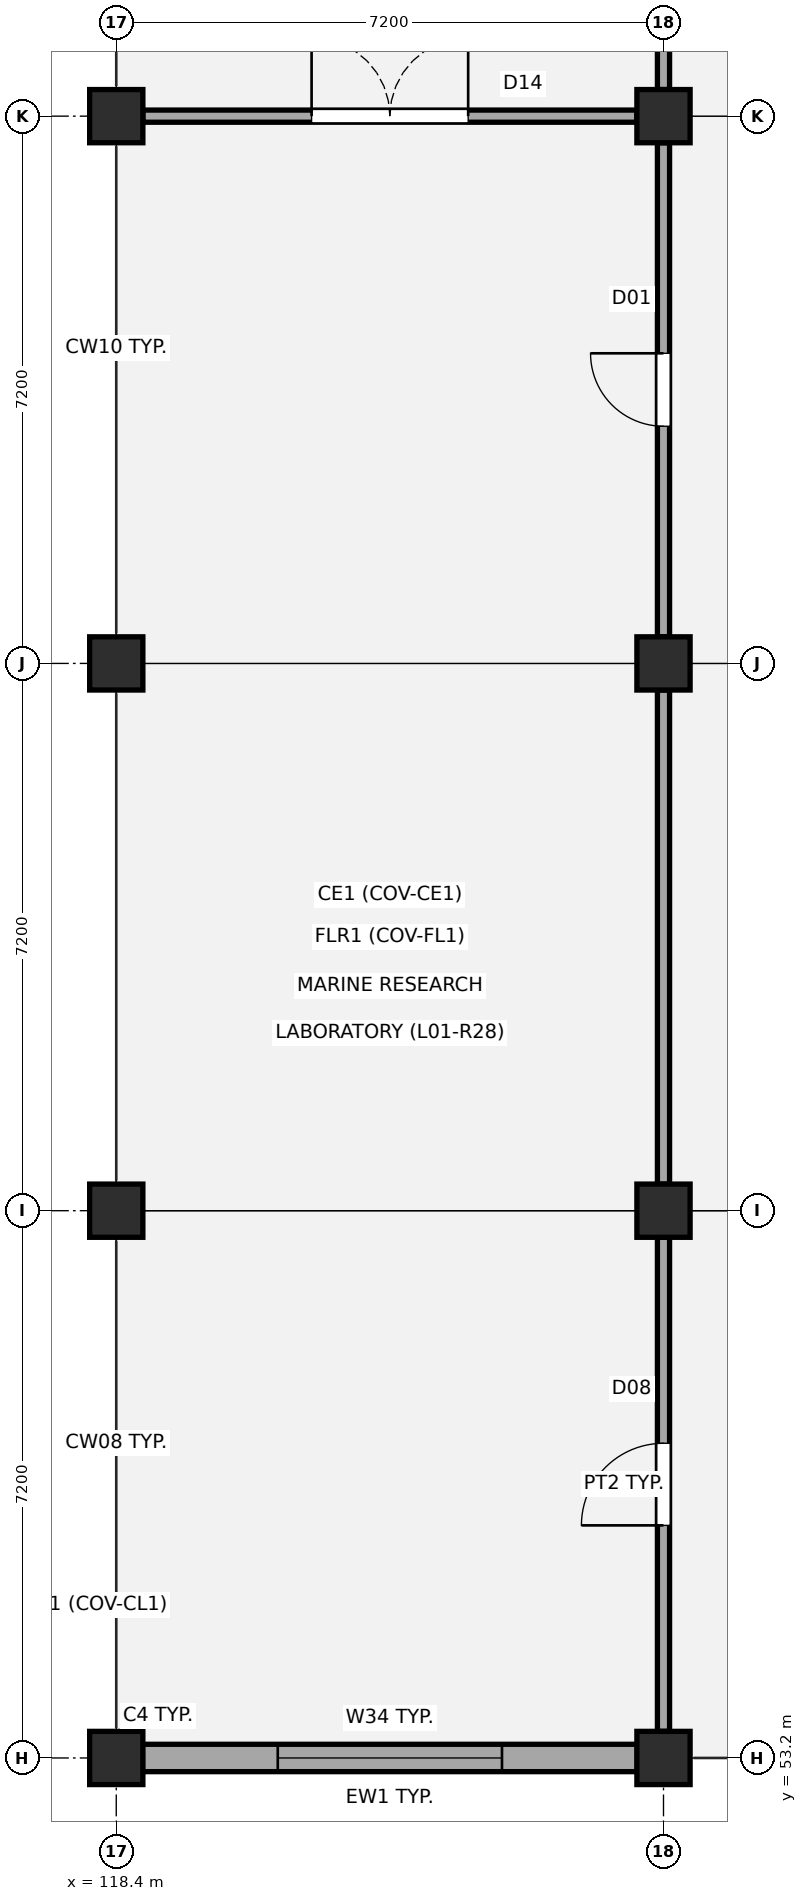
"""IFC4 building model, lengths in metres.
Left out: names, types, materials, properties, quantities, classifications, styles, units other than length and angle.
Written with IfcOpenShell. Run it as: python <this file> out.ifc"""

import sys

from ifc_helpers import new_model, si_unit, direction, frame, frame_2d, origin, origin_2d, place, context, subcontext, project, spatial, rectangle, extrude, element, fill, save


model = new_model("IFC4")
c1 = context("Model", 3, precision=1e-05, world=origin(), true_north=direction((0.0, 1.0)))
c2 = subcontext(c1, "Body", "Model", "MODEL_VIEW")
j1 = project(units=[si_unit("LENGTHUNIT", "METRE"), si_unit("PLANEANGLEUNIT", "RADIAN")], contexts=[c1])
p1 = place(None, origin())
s1 = spatial("IfcSite", under=j1, at=p1, CompositionType="ELEMENT")
p2 = place(p1, origin())
s2 = spatial("IfcBuilding", under=s1, at=p2, CompositionType="ELEMENT")
p3 = place(p2, frame((0.0, 0.0, 4.68)))
s3 = spatial("IfcBuildingStorey", under=s2, at=p3, CompositionType="ELEMENT", Elevation=4.68)
for number, where, z_axis, x_axis in (
    (1, (118.4, 53.2, 0.0), (0.0, 0.0, 1.0), (1.0, 0.0, 0.0)),
    (2, (118.4, 60.4, 0.0), (0.0, 0.0, 1.0), (1.0, 0.0, 0.0)),
    (3, (118.4, 67.6, 0.0), (0.0, 0.0, 1.0), (1.0, 0.0, 0.0)),
    (4, (118.4, 74.8, 0.0), (0.0, 0.0, 1.0), (1.0, 0.0, 0.0)),
    (5, (125.6, 53.2, 0.0), (0.0, 0.0, 1.0), (1.0, 0.0, 0.0)),
    (6, (125.6, 60.4, 0.0), (0.0, 0.0, 1.0), (1.0, 0.0, 0.0)),
    (7, (125.6, 67.6, 0.0), (0.0, 0.0, 1.0), (1.0, 0.0, 0.0)),
    (8, (125.6, 74.8, 0.0), (0.0, 0.0, 1.0), (1.0, 0.0, 0.0)),
):
    element("IfcColumn", number, at=place(p3, frame(where, z_axis=z_axis, x_axis=x_axis)), inside=s3, PredefinedType="COLUMN", context=c2, shape_type="SweptSolid", body=[
        extrude(rectangle(XDim=0.7, YDim=0.7, at=origin_2d()), origin(), (0.0, 0.0, 1.0), 4.5),
    ])
p4 = place(p3, frame((125.255, 53.2, 0.0), z_axis=(0.0, 0.0, 1.0), x_axis=(-1.0, 0.0, 0.0)))
e9 = element("IfcWall", 9, at=p4, inside=s3, PredefinedType="STANDARD", context=c2, shape_type="SweptSolid", body=[
    extrude(rectangle(XDim=6.51, YDim=0.36, at=frame_2d((3.255, 0.0))), origin(), (0.0, 0.0, 1.0), 3.51),
])
p5 = place(p4, frame((1.78, 0.0, 0.95)))
e10 = element("IfcOpeningElement", 10, at=p5, cuts=e9, PredefinedType="OPENING", context=c2, shape_type="SweptSolid", body=[
    extrude(rectangle(XDim=2.95, YDim=1.45, at=frame_2d((1.475, 0.725))), frame((0.0, 0.19, 0.0), z_axis=(0.0, -1.0, 0.0), x_axis=(1.0, 0.0, 0.0)), (0.0, 0.0, 1.0), 0.38),
])
p6 = place(p3, frame((125.6, 53.55, 0.0), z_axis=(0.0, 0.0, 1.0), x_axis=(0.0, 1.0, 0.0)))
e11 = element("IfcWall", 11, at=p6, inside=s3, PredefinedType="PARTITIONING", context=c2, shape_type="SweptSolid", body=[
    extrude(rectangle(XDim=6.5, YDim=0.16, at=frame_2d((3.25, 0.0))), origin(), (0.0, 0.0, 1.0), 3.59),
])
p7 = place(p6, frame((2.71, 0.0, 0.0)))
e12 = element("IfcOpeningElement", 12, at=p7, cuts=e11, PredefinedType="OPENING", context=c2, shape_type="SweptSolid", body=[
    extrude(rectangle(XDim=1.08, YDim=2.16, at=frame_2d((0.54, 1.08))), frame((0.0, 0.09, 0.0), z_axis=(0.0, -1.0, 0.0), x_axis=(1.0, 0.0, 0.0)), (0.0, 0.0, 1.0), 0.18),
])
p8 = place(p3, frame((125.6, 60.75, 0.0), z_axis=(0.0, 0.0, 1.0), x_axis=(0.0, 1.0, 0.0)))
e13 = element("IfcWall", 13, at=p8, inside=s3, PredefinedType="PARTITIONING", context=c2, shape_type="SweptSolid", body=[
    extrude(rectangle(XDim=6.5, YDim=0.16, at=frame_2d((3.25, 0.0))), origin(), (0.0, 0.0, 1.0), 3.54),
])
p9 = place(p3, frame((125.6, 67.95, 0.0), z_axis=(0.0, 0.0, 1.0), x_axis=(0.0, 1.0, 0.0)))
e14 = element("IfcWall", 14, at=p9, inside=s3, PredefinedType="PARTITIONING", context=c2, shape_type="SweptSolid", body=[
    extrude(rectangle(XDim=6.5, YDim=0.16, at=frame_2d((3.25, 0.0))), origin(), (0.0, 0.0, 1.0), 3.59),
])
p10 = place(p9, frame((2.77, 0.0, 0.0)))
e15 = element("IfcOpeningElement", 15, at=p10, cuts=e14, PredefinedType="OPENING", context=c2, shape_type="SweptSolid", body=[
    extrude(rectangle(XDim=0.96, YDim=2.1, at=frame_2d((0.48, 1.05))), frame((0.0, 0.09, 0.0), z_axis=(0.0, -1.0, 0.0), x_axis=(1.0, 0.0, 0.0)), (0.0, 0.0, 1.0), 0.18),
])
p11 = place(p3, frame((118.75, 74.8, 0.0), z_axis=(0.0, 0.0, 1.0), x_axis=(1.0, 0.0, 0.0)))
e16 = element("IfcWall", 16, at=p11, inside=s3, PredefinedType="PARTITIONING", context=c2, shape_type="SweptSolid", body=[
    extrude(rectangle(XDim=6.5, YDim=0.16, at=frame_2d((3.25, 0.0))), origin(), (0.0, 0.0, 1.0), 3.54),
])
p12 = place(p11, frame((2.22, 0.0, 0.0)))
e17 = element("IfcOpeningElement", 17, at=p12, cuts=e16, PredefinedType="OPENING", context=c2, shape_type="SweptSolid", body=[
    extrude(rectangle(XDim=2.06, YDim=2.28, at=frame_2d((1.03, 1.14))), frame((0.0, 0.09, 0.0), z_axis=(0.0, -1.0, 0.0), x_axis=(1.0, 0.0, 0.0)), (0.0, 0.0, 1.0), 0.18),
])
p13 = place(p3, frame((125.6, 75.15, 0.0), z_axis=(0.0, 0.0, 1.0), x_axis=(0.0, 1.0, 0.0)))
e18 = element("IfcWall", 18, at=p13, inside=s3, PredefinedType="PARTITIONING", context=c2, shape_type="SweptSolid", body=[
    extrude(rectangle(XDim=6.5, YDim=0.16, at=frame_2d((3.25, 0.0))), origin(), (0.0, 0.0, 1.0), 3.54),
])
p14 = place(p13, frame((2.71, 0.0, 0.0)))
e19 = element("IfcOpeningElement", 19, at=p14, cuts=e18, PredefinedType="OPENING", context=c2, shape_type="SweptSolid", body=[
    extrude(rectangle(XDim=1.08, YDim=2.16, at=frame_2d((0.54, 1.08))), frame((0.0, 0.09, 0.0), z_axis=(0.0, -1.0, 0.0), x_axis=(1.0, 0.0, 0.0)), (0.0, 0.0, 1.0), 0.18),
])
p15 = place(p5, origin())
e20 = element("IfcWindow", 20, at=p15, inside=s3, PartitioningType="SINGLE_PANEL", PredefinedType="WINDOW", context=c2, shape_type="SweptSolid", body=[
    extrude(rectangle(XDim=2.95, YDim=1.45, at=frame_2d((1.475, 0.725))), frame((0.0, 0.03, 0.0), z_axis=(0.0, -1.0, 0.0), x_axis=(1.0, 0.0, 0.0)), (0.0, 0.0, 1.0), 0.06),
])
fill(e10, e20)
p16 = place(p12, origin())
e21 = element("IfcDoor", 21, at=p16, inside=s3, OperationType="DOUBLE_DOOR_SINGLE_SWING", PredefinedType="DOOR", context=c2, shape_type="SweptSolid", body=[
    extrude(rectangle(XDim=2.06, YDim=2.28, at=frame_2d((1.03, 1.14))), frame((0.0, 0.025, 0.0), z_axis=(0.0, -1.0, 0.0), x_axis=(1.0, 0.0, 0.0)), (0.0, 0.0, 1.0), 0.05),
])
fill(e17, e21)
p17 = place(p7, origin())
e22 = element("IfcDoor", 22, at=p17, inside=s3, OperationType="SINGLE_SWING_LEFT", PredefinedType="DOOR", context=c2, shape_type="SweptSolid", body=[
    extrude(rectangle(XDim=1.08, YDim=2.16, at=frame_2d((0.54, 1.08))), frame((0.0, 0.025, 0.0), z_axis=(0.0, -1.0, 0.0), x_axis=(1.0, 0.0, 0.0)), (0.0, 0.0, 1.0), 0.05),
])
fill(e12, e22)
p18 = place(p10, origin())
e23 = element("IfcDoor", 23, at=p18, inside=s3, OperationType="SINGLE_SWING_RIGHT", PredefinedType="DOOR", context=c2, shape_type="SweptSolid", body=[
    extrude(rectangle(XDim=0.96, YDim=2.1, at=frame_2d((0.48, 1.05))), frame((0.0, 0.025, 0.0), z_axis=(0.0, -1.0, 0.0), x_axis=(1.0, 0.0, 0.0)), (0.0, 0.0, 1.0), 0.05),
])
fill(e15, e23)
save(model, sys.argv[1])
